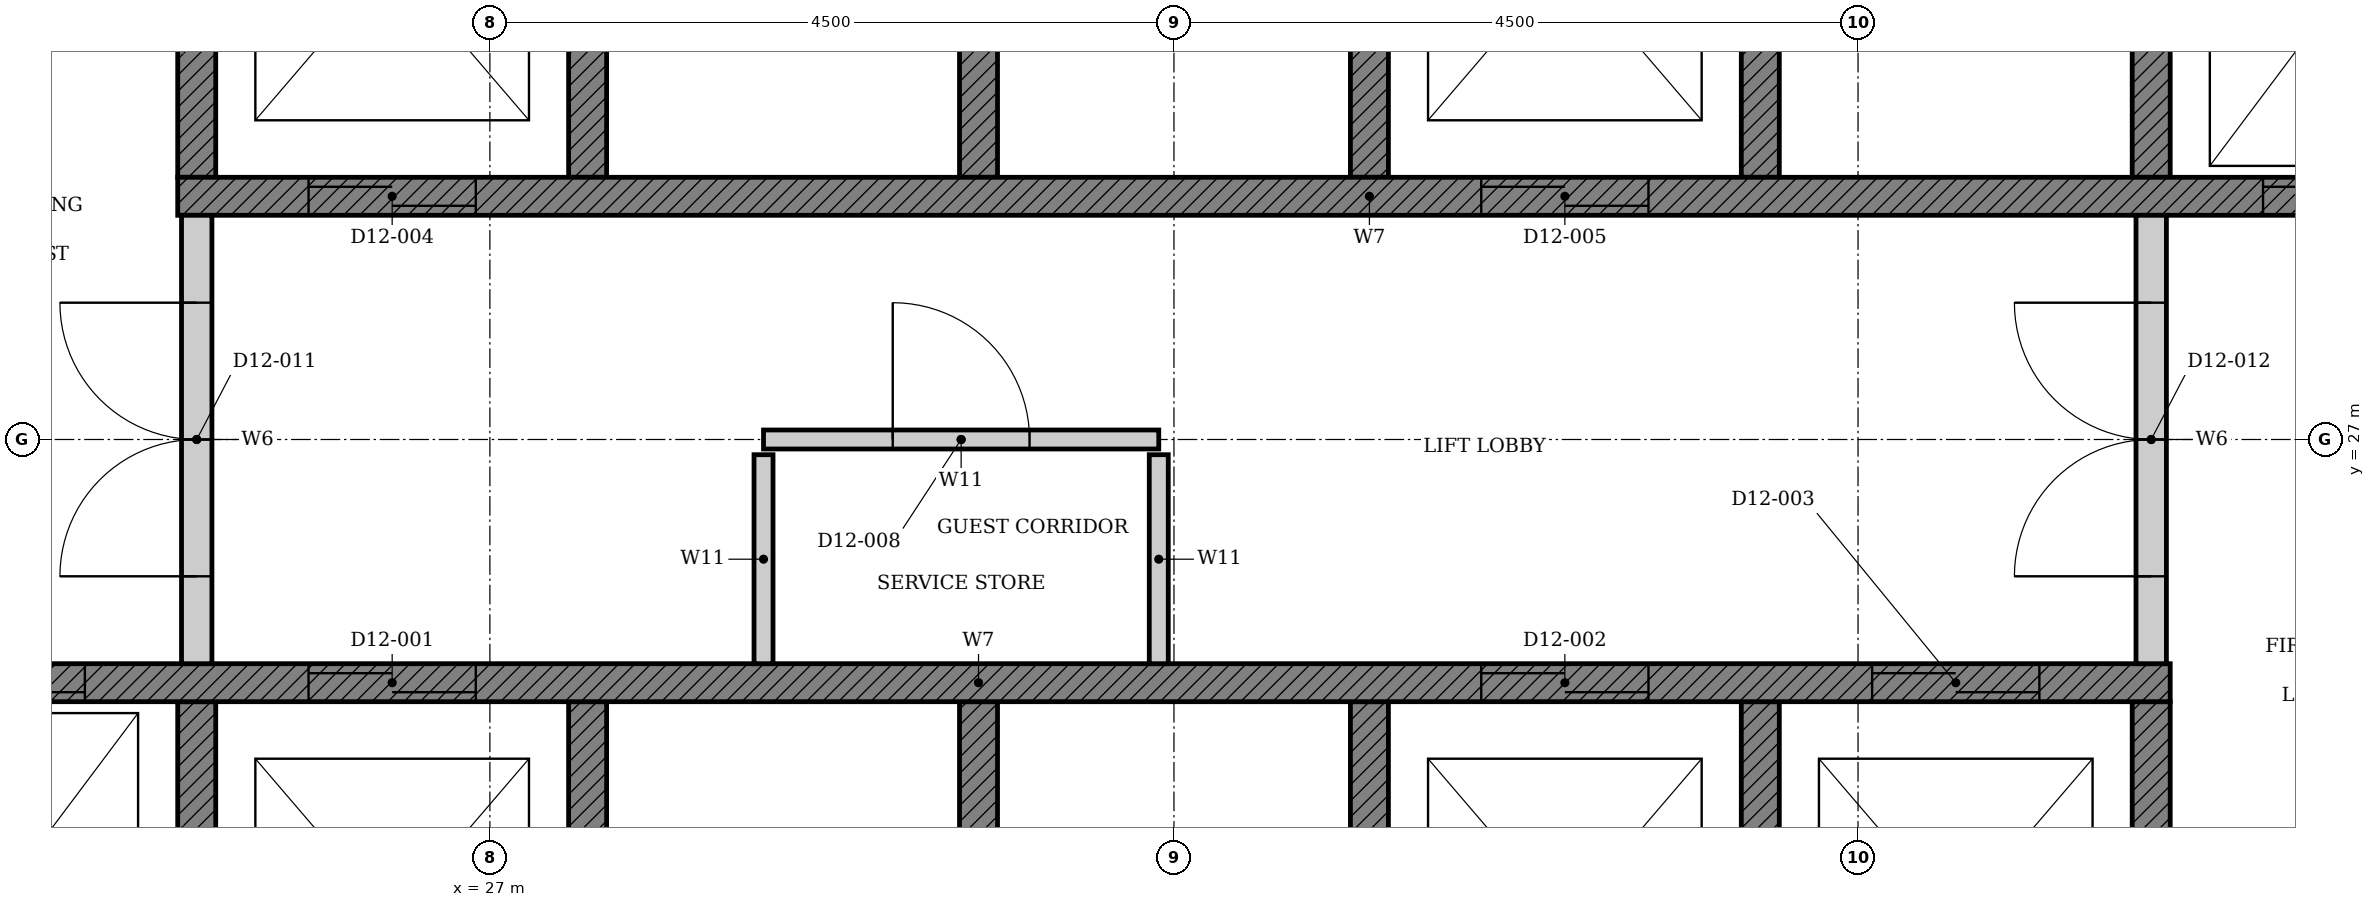
"""IFC4 building model, lengths in metres.
Left out: names, types, materials, properties, quantities, classifications, styles, units other than length and angle.
Written with IfcOpenShell. Run it as: python <this file> out.ifc"""

import sys

from ifc_helpers import new_model, si_unit, direction, frame, frame_2d, origin, place, context, subcontext, project, spatial, polyline, rectangle, outline, extrude, element, fill, save


model = new_model("IFC4")
c1 = context("Model", 3, precision=1e-05, world=origin(), true_north=direction((0.0, 1.0)))
c2 = subcontext(c1, "Body", "Model", "MODEL_VIEW")
j1 = project(units=[si_unit("LENGTHUNIT", "METRE"), si_unit("PLANEANGLEUNIT", "RADIAN")], contexts=[c1])
p1 = place(None, origin())
s1 = spatial("IfcSite", under=j1, at=p1, CompositionType="ELEMENT")
p2 = place(p1, origin())
s2 = spatial("IfcBuilding", under=s1, at=p2, CompositionType="ELEMENT")
p3 = place(p2, frame((0.0, 0.0, 56.4)))
s3 = spatial("IfcBuildingStorey", under=s2, at=p3, CompositionType="ELEMENT", Elevation=56.4)
p4 = place(p3, origin())
e1 = element("IfcWall", 1, at=p4, inside=s3, PredefinedType="SHEAR", context=c2, shape_type="SweptSolid", body=[
    extrude(outline(polyline([(22.375, 22.35), (38.053, 22.35), (38.053, 25.275), (37.803, 25.275), (37.803, 22.65), (35.482, 22.65), (35.482, 25.275), (35.232, 25.275), (35.232, 22.65), (32.911, 22.65), (32.911, 25.275), (32.661, 25.275), (32.661, 22.65), (30.339, 22.65), (30.339, 25.275), (30.089, 25.275), (30.089, 22.65), (27.768, 22.65), (27.768, 25.275), (27.518, 25.275), (27.518, 22.65), (25.197, 22.65), (25.197, 25.275), (24.947, 25.275), (24.947, 22.65), (22.625, 22.65), (22.625, 25.275), (22.375, 25.275), (22.375, 22.35)])), origin(), (0.0, 0.0, 1.0), 3.3),
])
p5 = place(p3, origin())
e2 = element("IfcWall", 2, at=p5, inside=s3, PredefinedType="SHEAR", context=c2, shape_type="SweptSolid", body=[
    extrude(outline(polyline([(24.947, 28.725), (25.197, 28.725), (25.197, 31.35), (27.518, 31.35), (27.518, 28.725), (27.768, 28.725), (27.768, 31.35), (30.089, 31.35), (30.089, 28.725), (30.339, 28.725), (30.339, 31.35), (32.661, 31.35), (32.661, 28.725), (32.911, 28.725), (32.911, 31.35), (35.232, 31.35), (35.232, 28.725), (35.482, 28.725), (35.482, 31.35), (37.803, 31.35), (37.803, 28.725), (38.053, 28.725), (38.053, 31.35), (40.375, 31.35), (40.375, 28.725), (40.625, 28.725), (40.625, 31.65), (24.947, 31.65), (24.947, 28.725)])), origin(), (0.0, 0.0, 1.0), 3.3),
])
p6 = place(p3, frame((22.375, 25.4, 0.0), z_axis=(0.0, 0.0, 1.0), x_axis=(1.0, 0.0, 0.0)))
e3 = element("IfcWall", 3, at=p6, inside=s3, PredefinedType="SHEAR", context=c2, shape_type="SweptSolid", body=[
    extrude(rectangle(XDim=15.678, YDim=0.25, at=frame_2d((7.839, 0.0))), origin(), (0.0, 0.0, 1.0), 3.3),
])
p7 = place(p6, frame((3.432, 0.0, 0.0)))
e4 = element("IfcOpeningElement", 4, at=p7, cuts=e3, PredefinedType="OPENING", context=c2, shape_type="SweptSolid", body=[
    extrude(rectangle(XDim=1.1, YDim=2.1, at=frame_2d((0.55, 1.05))), frame((0.0, 0.135, 0.0), z_axis=(0.0, -1.0, 0.0), x_axis=(1.0, 0.0, 0.0)), (0.0, 0.0, 1.0), 0.27),
])
p8 = place(p6, frame((11.146, 0.0, 0.0)))
e5 = element("IfcOpeningElement", 5, at=p8, cuts=e3, PredefinedType="OPENING", context=c2, shape_type="SweptSolid", body=[
    extrude(rectangle(XDim=1.1, YDim=2.1, at=frame_2d((0.55, 1.05))), frame((0.0, 0.135, 0.0), z_axis=(0.0, -1.0, 0.0), x_axis=(1.0, 0.0, 0.0)), (0.0, 0.0, 1.0), 0.27),
])
p9 = place(p6, frame((13.718, 0.0, 0.0)))
e6 = element("IfcOpeningElement", 6, at=p9, cuts=e3, PredefinedType="OPENING", context=c2, shape_type="SweptSolid", body=[
    extrude(rectangle(XDim=1.1, YDim=2.1, at=frame_2d((0.55, 1.05))), frame((0.0, 0.135, 0.0), z_axis=(0.0, -1.0, 0.0), x_axis=(1.0, 0.0, 0.0)), (0.0, 0.0, 1.0), 0.27),
])
p10 = place(p6, frame((0.861, 0.0, 0.0)))
e7 = element("IfcOpeningElement", 7, at=p10, cuts=e3, PredefinedType="OPENING", context=c2, shape_type="SweptSolid", body=[
    extrude(rectangle(XDim=1.1, YDim=2.1, at=frame_2d((0.55, 1.05))), frame((0.0, 0.135, 0.0), z_axis=(0.0, -1.0, 0.0), x_axis=(1.0, 0.0, 0.0)), (0.0, 0.0, 1.0), 0.27),
])
p11 = place(p3, frame((24.947, 28.6, 0.0), z_axis=(0.0, 0.0, 1.0), x_axis=(1.0, 0.0, 0.0)))
e8 = element("IfcWall", 8, at=p11, inside=s3, PredefinedType="SHEAR", context=c2, shape_type="SweptSolid", body=[
    extrude(rectangle(XDim=15.678, YDim=0.25, at=frame_2d((7.839, 0.0))), origin(), (0.0, 0.0, 1.0), 3.3),
])
p12 = place(p11, frame((0.861, 0.0, 0.0)))
e9 = element("IfcOpeningElement", 9, at=p12, cuts=e8, PredefinedType="OPENING", context=c2, shape_type="SweptSolid", body=[
    extrude(rectangle(XDim=1.1, YDim=2.1, at=frame_2d((0.55, 1.05))), frame((0.0, 0.135, 0.0), z_axis=(0.0, -1.0, 0.0), x_axis=(1.0, 0.0, 0.0)), (0.0, 0.0, 1.0), 0.27),
])
p13 = place(p11, frame((8.575, 0.0, 0.0)))
e10 = element("IfcOpeningElement", 10, at=p13, cuts=e8, PredefinedType="OPENING", context=c2, shape_type="SweptSolid", body=[
    extrude(rectangle(XDim=1.1, YDim=2.1, at=frame_2d((0.55, 1.05))), frame((0.0, 0.135, 0.0), z_axis=(0.0, -1.0, 0.0), x_axis=(1.0, 0.0, 0.0)), (0.0, 0.0, 1.0), 0.27),
])
p14 = place(p11, frame((13.718, 0.0, 0.0)))
e11 = element("IfcOpeningElement", 11, at=p14, cuts=e8, PredefinedType="OPENING", context=c2, shape_type="SweptSolid", body=[
    extrude(rectangle(XDim=1.1, YDim=2.1, at=frame_2d((0.55, 1.05))), frame((0.0, 0.135, 0.0), z_axis=(0.0, -1.0, 0.0), x_axis=(1.0, 0.0, 0.0)), (0.0, 0.0, 1.0), 0.27),
])
p15 = place(p3, frame((28.8, 27.0, 0.0), z_axis=(0.0, 0.0, 1.0), x_axis=(1.0, 0.0, 0.0)))
e12 = element("IfcWall", 12, at=p15, inside=s3, PredefinedType="PARTITIONING", context=c2, shape_type="SweptSolid", body=[
    extrude(rectangle(XDim=2.6, YDim=0.125, at=frame_2d((1.3, 0.0))), origin(), (0.0, 0.0, 1.0), 3.3),
])
p16 = place(p15, frame((0.85, 0.0, 0.0)))
e13 = element("IfcOpeningElement", 13, at=p16, cuts=e12, PredefinedType="OPENING", context=c2, shape_type="SweptSolid", body=[
    extrude(rectangle(XDim=0.9, YDim=2.1, at=frame_2d((0.45, 1.05))), frame((0.0, 0.073, 0.0), z_axis=(0.0, -1.0, 0.0), x_axis=(1.0, 0.0, 0.0)), (0.0, 0.0, 1.0), 0.145),
])
for number, where, z_axis, x_axis in (
    (14, (28.8, 25.525, 0.0), (0.0, 0.0, 1.0), (0.0, 1.0, 0.0)),
    (15, (31.4, 25.525, 0.0), (0.0, 0.0, 1.0), (0.0, 1.0, 0.0)),
):
    element("IfcWall", number, at=place(p3, frame(where, z_axis=z_axis, x_axis=x_axis)), inside=s3, PredefinedType="PARTITIONING", context=c2, shape_type="SweptSolid", body=[
        extrude(rectangle(XDim=1.375, YDim=0.125, at=frame_2d((0.688, 0.0))), origin(), (0.0, 0.0, 1.0), 3.3),
    ])
p17 = place(p3, frame((25.072, 25.525, 0.0), z_axis=(0.0, 0.0, 1.0), x_axis=(0.0, 1.0, 0.0)))
e16 = element("IfcWall", 16, at=p17, inside=s3, PredefinedType="PARTITIONING", context=c2, shape_type="SweptSolid", body=[
    extrude(rectangle(XDim=2.95, YDim=0.2, at=frame_2d((1.475, 0.0))), origin(), (0.0, 0.0, 1.0), 3.3),
])
p18 = place(p17, frame((0.575, 0.0, 0.0)))
e17 = element("IfcOpeningElement", 17, at=p18, cuts=e16, PredefinedType="OPENING", context=c2, shape_type="SweptSolid", body=[
    extrude(rectangle(XDim=1.8, YDim=2.1, at=frame_2d((0.9, 1.05))), frame((0.0, 0.11, 0.0), z_axis=(0.0, -1.0, 0.0), x_axis=(1.0, 0.0, 0.0)), (0.0, 0.0, 1.0), 0.22),
])
p19 = place(p3, frame((37.928, 25.525, 0.0), z_axis=(0.0, 0.0, 1.0), x_axis=(0.0, 1.0, 0.0)))
e18 = element("IfcWall", 18, at=p19, inside=s3, PredefinedType="PARTITIONING", context=c2, shape_type="SweptSolid", body=[
    extrude(rectangle(XDim=2.95, YDim=0.2, at=frame_2d((1.475, 0.0))), origin(), (0.0, 0.0, 1.0), 3.3),
])
p20 = place(p19, frame((0.575, 0.0, 0.0)))
e19 = element("IfcOpeningElement", 19, at=p20, cuts=e18, PredefinedType="OPENING", context=c2, shape_type="SweptSolid", body=[
    extrude(rectangle(XDim=1.8, YDim=2.1, at=frame_2d((0.9, 1.05))), frame((0.0, 0.11, 0.0), z_axis=(0.0, -1.0, 0.0), x_axis=(1.0, 0.0, 0.0)), (0.0, 0.0, 1.0), 0.22),
])
p21 = place(p7, origin())
e20 = element("IfcDoor", 20, at=p21, inside=s3, OperationType="DOUBLE_DOOR_SLIDING", PredefinedType="DOOR", context=c2, shape_type="SweptSolid", body=[
    extrude(rectangle(XDim=1.1, YDim=2.1, at=frame_2d((0.55, 1.05))), frame((0.0, 0.025, 0.0), z_axis=(0.0, -1.0, 0.0), x_axis=(1.0, 0.0, 0.0)), (0.0, 0.0, 1.0), 0.05),
])
fill(e4, e20)
p22 = place(p8, origin())
e21 = element("IfcDoor", 21, at=p22, inside=s3, OperationType="DOUBLE_DOOR_SLIDING", PredefinedType="DOOR", context=c2, shape_type="SweptSolid", body=[
    extrude(rectangle(XDim=1.1, YDim=2.1, at=frame_2d((0.55, 1.05))), frame((0.0, 0.025, 0.0), z_axis=(0.0, -1.0, 0.0), x_axis=(1.0, 0.0, 0.0)), (0.0, 0.0, 1.0), 0.05),
])
fill(e5, e21)
p23 = place(p9, origin())
e22 = element("IfcDoor", 22, at=p23, inside=s3, OperationType="DOUBLE_DOOR_SLIDING", PredefinedType="DOOR", context=c2, shape_type="SweptSolid", body=[
    extrude(rectangle(XDim=1.1, YDim=2.1, at=frame_2d((0.55, 1.05))), frame((0.0, 0.025, 0.0), z_axis=(0.0, -1.0, 0.0), x_axis=(1.0, 0.0, 0.0)), (0.0, 0.0, 1.0), 0.05),
])
fill(e6, e22)
p24 = place(p12, origin())
e23 = element("IfcDoor", 23, at=p24, inside=s3, OperationType="DOUBLE_DOOR_SLIDING", PredefinedType="DOOR", context=c2, shape_type="SweptSolid", body=[
    extrude(rectangle(XDim=1.1, YDim=2.1, at=frame_2d((0.55, 1.05))), frame((0.0, 0.025, 0.0), z_axis=(0.0, -1.0, 0.0), x_axis=(1.0, 0.0, 0.0)), (0.0, 0.0, 1.0), 0.05),
])
fill(e9, e23)
p25 = place(p13, origin())
e24 = element("IfcDoor", 24, at=p25, inside=s3, OperationType="DOUBLE_DOOR_SLIDING", PredefinedType="DOOR", context=c2, shape_type="SweptSolid", body=[
    extrude(rectangle(XDim=1.1, YDim=2.1, at=frame_2d((0.55, 1.05))), frame((0.0, 0.025, 0.0), z_axis=(0.0, -1.0, 0.0), x_axis=(1.0, 0.0, 0.0)), (0.0, 0.0, 1.0), 0.05),
])
fill(e10, e24)
p26 = place(p10, origin())
e25 = element("IfcDoor", 25, at=p26, inside=s3, OperationType="DOUBLE_DOOR_SLIDING", PredefinedType="DOOR", context=c2, shape_type="SweptSolid", body=[
    extrude(rectangle(XDim=1.1, YDim=2.1, at=frame_2d((0.55, 1.05))), frame((0.0, 0.025, 0.0), z_axis=(0.0, -1.0, 0.0), x_axis=(1.0, 0.0, 0.0)), (0.0, 0.0, 1.0), 0.05),
])
fill(e7, e25)
p27 = place(p14, origin())
e26 = element("IfcDoor", 26, at=p27, inside=s3, OperationType="DOUBLE_DOOR_SLIDING", PredefinedType="DOOR", context=c2, shape_type="SweptSolid", body=[
    extrude(rectangle(XDim=1.1, YDim=2.1, at=frame_2d((0.55, 1.05))), frame((0.0, 0.025, 0.0), z_axis=(0.0, -1.0, 0.0), x_axis=(1.0, 0.0, 0.0)), (0.0, 0.0, 1.0), 0.05),
])
fill(e11, e26)
p28 = place(p16, origin())
e27 = element("IfcDoor", 27, at=p28, inside=s3, OperationType="SINGLE_SWING_LEFT", PredefinedType="DOOR", context=c2, shape_type="SweptSolid", body=[
    extrude(rectangle(XDim=0.9, YDim=2.1, at=frame_2d((0.45, 1.05))), frame((0.0, 0.025, 0.0), z_axis=(0.0, -1.0, 0.0), x_axis=(1.0, 0.0, 0.0)), (0.0, 0.0, 1.0), 0.05),
])
fill(e13, e27)
p29 = place(p18, origin())
e28 = element("IfcDoor", 28, at=p29, inside=s3, OperationType="DOUBLE_DOOR_SINGLE_SWING", PredefinedType="DOOR", context=c2, shape_type="SweptSolid", body=[
    extrude(rectangle(XDim=1.8, YDim=2.1, at=frame_2d((0.9, 1.05))), frame((0.0, 0.025, 0.0), z_axis=(0.0, -1.0, 0.0), x_axis=(1.0, 0.0, 0.0)), (0.0, 0.0, 1.0), 0.05),
])
fill(e17, e28)
p30 = place(p20, origin())
e29 = element("IfcDoor", 29, at=p30, inside=s3, OperationType="DOUBLE_DOOR_SINGLE_SWING", PredefinedType="DOOR", context=c2, shape_type="SweptSolid", body=[
    extrude(rectangle(XDim=1.8, YDim=2.1, at=frame_2d((0.9, 1.05))), frame((0.0, 0.025, 0.0), z_axis=(0.0, -1.0, 0.0), x_axis=(1.0, 0.0, 0.0)), (0.0, 0.0, 1.0), 0.05),
])
fill(e19, e29)
save(model, sys.argv[1])
